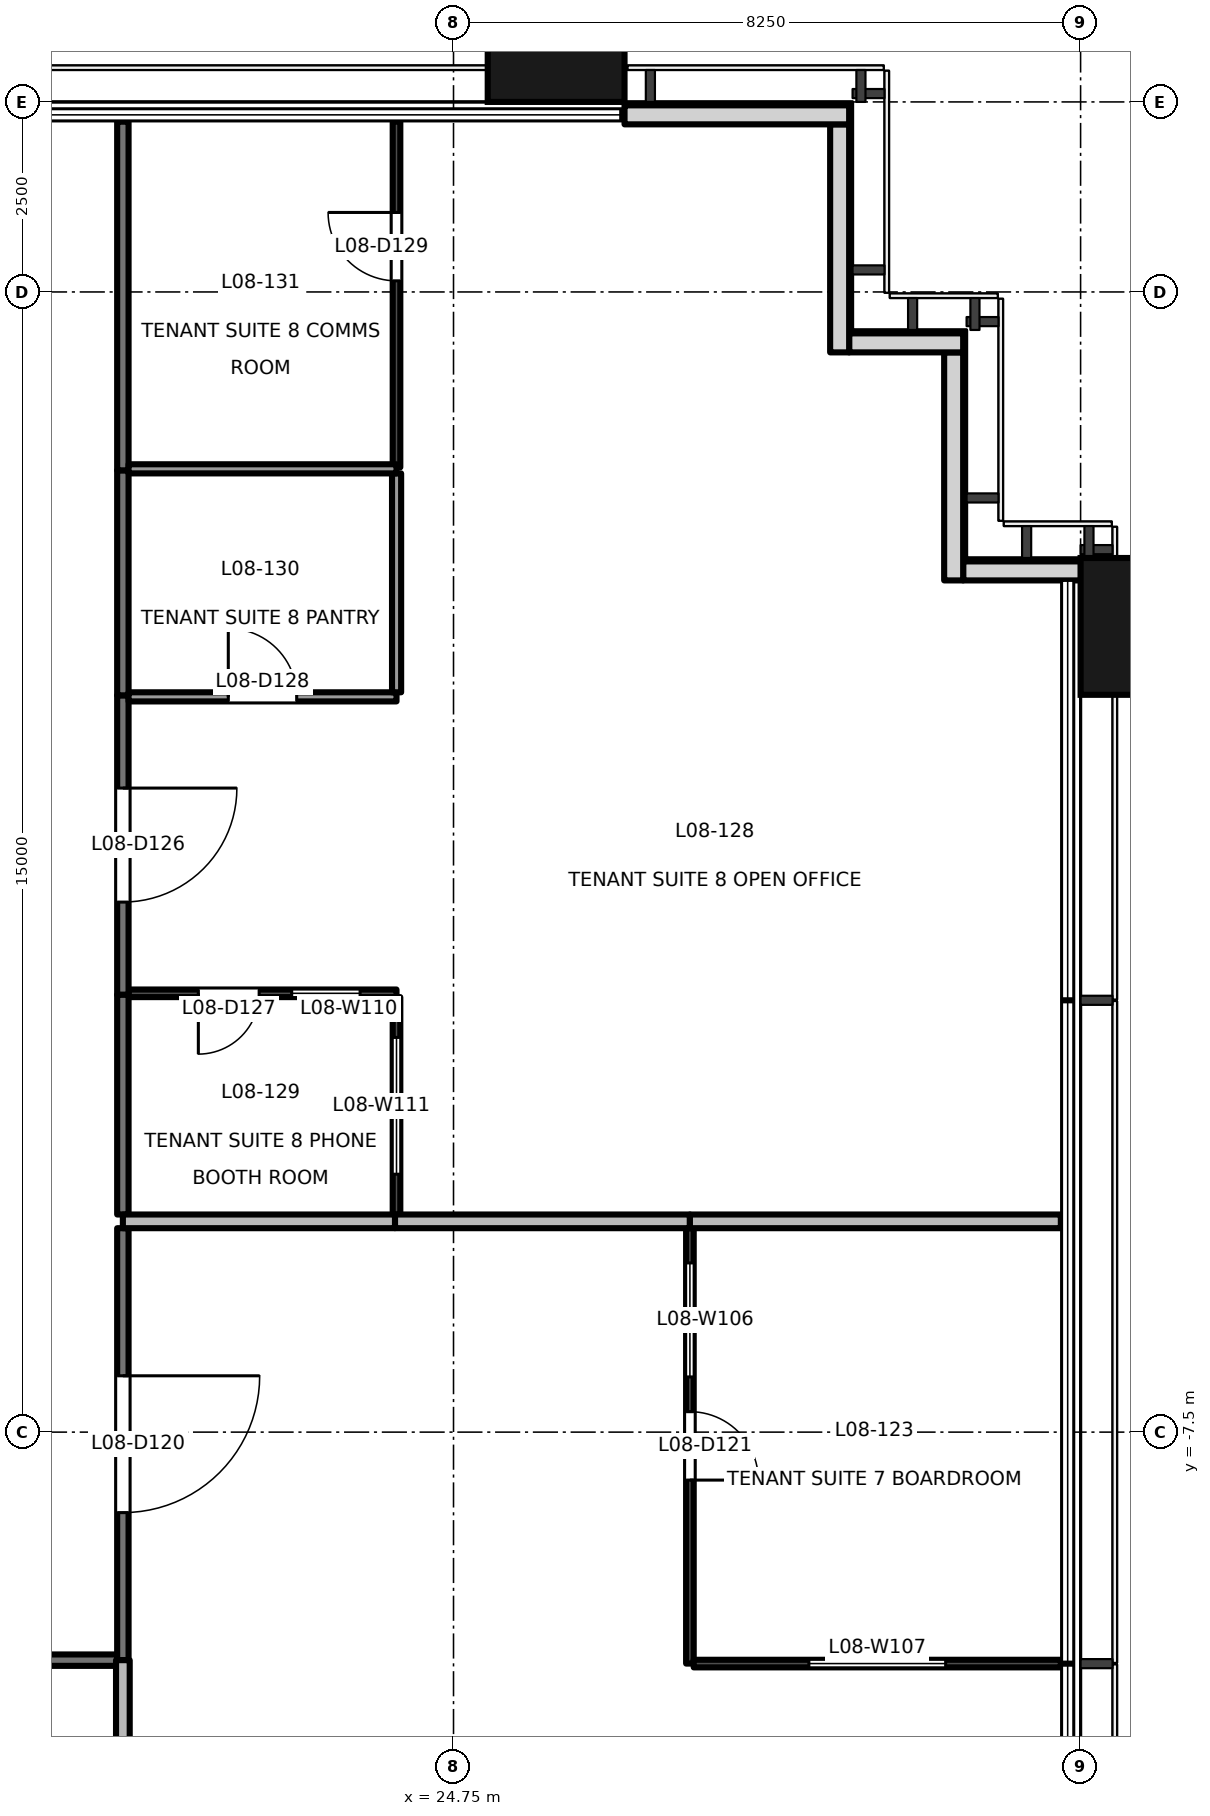
"""IFC4 building model, lengths in metres.
Left out: names, types, materials, properties, quantities, classifications, styles, units other than length and angle.
Written with IfcOpenShell. Run it as: python <this file> out.ifc"""

import sys

from ifc_helpers import new_model, si_unit, direction, frame, frame_2d, origin, origin_2d, place, context, subcontext, project, spatial, rectangle, extrude, element, fill, save


model = new_model("IFC4")
c1 = context("Model", 3, precision=1e-05, world=origin(), true_north=direction((0.0, 1.0)))
c2 = subcontext(c1, "Body", "Model", "MODEL_VIEW")
j1 = project(units=[si_unit("LENGTHUNIT", "METRE"), si_unit("PLANEANGLEUNIT", "RADIAN")], contexts=[c1])
p1 = place(None, origin())
s1 = spatial("IfcSite", under=j1, at=p1, CompositionType="ELEMENT")
p2 = place(p1, origin())
s2 = spatial("IfcBuilding", under=s1, at=p2, CompositionType="ELEMENT")
p3 = place(p2, frame((0.0, 0.0, 40.6)))
s3 = spatial("IfcBuildingStorey", under=s2, at=p3, CompositionType="ELEMENT", Elevation=40.6)
for number, where, z_axis, x_axis in (
    (1, (33.9, 3.1, -0.2), (0.0, 0.0, 1.0), (0.0, 1.0, 0.0)),
    (2, (26.1, 10.9, -0.2), (0.0, 0.0, 1.0), (1.0, 0.0, 0.0)),
):
    element("IfcColumn", number, at=place(p3, frame(where, z_axis=z_axis, x_axis=x_axis)), inside=s3, PredefinedType="COLUMN", context=c2, shape_type="SweptSolid", body=[
        extrude(rectangle(XDim=1.8, YDim=1.8, at=origin_2d()), origin(), (0.0, 0.0, 1.0), 4.1),
    ])
p4 = place(p3, frame((33.005, 3.83, 0.0), z_axis=(0.0, 0.0, 1.0), x_axis=(-1.0, 0.0, 0.0)))
e3 = element("IfcWall", 3, at=p4, inside=s3, PredefinedType="SOLIDWALL", context=c2, shape_type="SweptSolid", body=[
    extrude(rectangle(XDim=1.55, YDim=0.25, at=frame_2d((0.775, 0.0))), origin(), (0.0, 0.0, 1.0), 3.9),
])
p5 = place(p3, frame((31.33, 3.705, 0.0), z_axis=(0.0, 0.0, 1.0), x_axis=(0.0, 1.0, 0.0)))
e4 = element("IfcWall", 4, at=p5, inside=s3, PredefinedType="SOLIDWALL", context=c2, shape_type="SweptSolid", body=[
    extrude(rectangle(XDim=3.0, YDim=0.25, at=frame_2d((1.5, 0.0))), origin(), (0.0, 0.0, 1.0), 3.9),
])
p6 = place(p3, frame((31.455, 6.83, 0.0), z_axis=(0.0, 0.0, 1.0), x_axis=(-1.0, 0.0, 0.0)))
e5 = element("IfcWall", 5, at=p6, inside=s3, PredefinedType="SOLIDWALL", context=c2, shape_type="SweptSolid", body=[
    extrude(rectangle(XDim=1.5, YDim=0.25, at=frame_2d((0.75, 0.0))), origin(), (0.0, 0.0, 1.0), 3.9),
])
p7 = place(p3, frame((29.83, 6.705, 0.0), z_axis=(0.0, 0.0, 1.0), x_axis=(0.0, 1.0, 0.0)))
e6 = element("IfcWall", 6, at=p7, inside=s3, PredefinedType="SOLIDWALL", context=c2, shape_type="SweptSolid", body=[
    extrude(rectangle(XDim=3.0, YDim=0.25, at=frame_2d((1.5, 0.0))), origin(), (0.0, 0.0, 1.0), 3.9),
])
p8 = place(p3, frame((29.955, 9.83, 0.0), z_axis=(0.0, 0.0, 1.0), x_axis=(-1.0, 0.0, 0.0)))
e7 = element("IfcWall", 7, at=p8, inside=s3, PredefinedType="SOLIDWALL", context=c2, shape_type="SweptSolid", body=[
    extrude(rectangle(XDim=2.955, YDim=0.25, at=frame_2d((1.478, 0.0))), origin(), (0.0, 0.0, 1.0), 3.9),
])
p9 = place(p3, frame((20.325, -10.5, 0.0), z_axis=(0.0, 0.0, 1.0), x_axis=(-1.0, 0.0, 0.0)))
e8 = element("IfcWall", 8, at=p9, inside=s3, PredefinedType="PARTITIONING", context=c2, shape_type="SweptSolid", body=[
    extrude(rectangle(XDim=4.445, YDim=0.15, at=frame_2d((2.223, 0.0))), origin(), (0.0, 0.0, 1.0), 2.5),
])
p10 = place(p3, frame((20.4, -4.817, 0.0), z_axis=(0.0, 0.0, 1.0), x_axis=(0.0, -1.0, 0.0)))
e9 = element("IfcWall", 9, at=p10, inside=s3, PredefinedType="PARTITIONING", context=c2, shape_type="SweptSolid", body=[
    extrude(rectangle(XDim=5.683, YDim=0.15, at=frame_2d((2.842, 0.0))), origin(), (0.0, 0.0, 1.0), 3.3),
])
p11 = place(p10, frame((1.942, 0.0, 0.0)))
e10 = element("IfcOpeningElement", 10, at=p11, cuts=e9, PredefinedType="OPENING", context=c2, shape_type="SweptSolid", body=[
    extrude(rectangle(XDim=1.8, YDim=2.1, at=frame_2d((0.9, 1.05))), frame((0.0, 0.085, 0.0), z_axis=(0.0, -1.0, 0.0), x_axis=(1.0, 0.0, 0.0)), (0.0, 0.0, 1.0), 0.171),
])
p12 = place(p3, frame((20.4, 2.193, 0.0), z_axis=(0.0, 0.0, 1.0), x_axis=(0.0, -1.0, 0.0)))
e11 = element("IfcWall", 11, at=p12, inside=s3, PredefinedType="PARTITIONING", context=c2, shape_type="SweptSolid", body=[
    extrude(rectangle(XDim=3.94, YDim=0.15, at=frame_2d((1.97, 0.0))), origin(), (0.0, 0.0, 1.0), 3.3),
])
p13 = place(p12, frame((1.22, 0.0, 0.0)))
e12 = element("IfcOpeningElement", 12, at=p13, cuts=e11, PredefinedType="OPENING", context=c2, shape_type="SweptSolid", body=[
    extrude(rectangle(XDim=1.5, YDim=2.1, at=frame_2d((0.75, 1.05))), frame((0.0, 0.085, 0.0), z_axis=(0.0, -1.0, 0.0), x_axis=(1.0, 0.0, 0.0)), (0.0, 0.0, 1.0), 0.171),
])
p14 = place(p3, frame((20.4, -1.747, 0.0), z_axis=(0.0, 0.0, 1.0), x_axis=(0.0, -1.0, 0.0)))
e13 = element("IfcWall", 13, at=p14, inside=s3, PredefinedType="PARTITIONING", context=c2, shape_type="SweptSolid", body=[
    extrude(rectangle(XDim=2.89, YDim=0.15, at=frame_2d((1.445, 0.0))), origin(), (0.0, 0.0, 1.0), 3.3),
])
p15 = place(p3, frame((20.4, 5.153, 0.0), z_axis=(0.0, 0.0, 1.0), x_axis=(0.0, -1.0, 0.0)))
e14 = element("IfcWall", 14, at=p15, inside=s3, PredefinedType="PARTITIONING", context=c2, shape_type="SweptSolid", body=[
    extrude(rectangle(XDim=2.96, YDim=0.15, at=frame_2d((1.48, 0.0))), origin(), (0.0, 0.0, 1.0), 3.9),
])
p16 = place(p3, frame((20.4, 9.74, 0.0), z_axis=(0.0, 0.0, 1.0), x_axis=(0.0, -1.0, 0.0)))
e15 = element("IfcWall", 15, at=p16, inside=s3, PredefinedType="PARTITIONING", context=c2, shape_type="SweptSolid", body=[
    extrude(rectangle(XDim=4.587, YDim=0.15, at=frame_2d((2.293, 0.0))), origin(), (0.0, 0.0, 1.0), 3.9),
])
p17 = place(p3, frame((20.4, -10.5, 0.0), z_axis=(0.0, 0.0, 1.0), x_axis=(0.0, -1.0, 0.0)))
e16 = element("IfcWall", 16, at=p17, inside=s3, PredefinedType="PARTITIONING", context=c2, shape_type="SweptSolid", body=[
    extrude(rectangle(XDim=4.5, YDim=0.18, at=frame_2d((2.25, 0.0))), origin(), (0.0, 0.0, 1.0), 3.3),
])
p18 = place(p3, frame((27.86, -4.817, 0.0), z_axis=(0.0, 0.0, 1.0), x_axis=(0.0, -1.0, 0.0)))
e17 = element("IfcWall", 17, at=p18, inside=s3, PredefinedType="PARTITIONING", context=c2, shape_type="SweptSolid", body=[
    extrude(rectangle(XDim=5.728, YDim=0.1, at=frame_2d((2.864, 0.0))), origin(), (0.0, 0.0, 1.0), 3.3),
])
p19 = place(p18, frame((2.414, 0.0, 0.0)))
e18 = element("IfcOpeningElement", 18, at=p19, cuts=e17, PredefinedType="OPENING", context=c2, shape_type="SweptSolid", body=[
    extrude(rectangle(XDim=0.9, YDim=2.1, at=frame_2d((0.45, 1.05))), frame((0.0, 0.061, 0.0), z_axis=(0.0, -1.0, 0.0), x_axis=(1.0, 0.0, 0.0)), (0.0, 0.0, 1.0), 0.121),
])
p20 = place(p18, frame((0.457, 0.0, 0.9)))
e19 = element("IfcOpeningElement", 19, at=p20, cuts=e17, PredefinedType="OPENING", context=c2, shape_type="SweptSolid", body=[
    extrude(rectangle(XDim=1.5, YDim=1.2, at=frame_2d((0.75, 0.6))), frame((0.0, 0.061, 0.0), z_axis=(0.0, -1.0, 0.0), x_axis=(1.0, 0.0, 0.0)), (0.0, 0.0, 1.0), 0.121),
])
p21 = place(p3, frame((27.91, -10.545, 0.0), z_axis=(0.0, 0.0, 1.0), x_axis=(1.0, 0.0, 0.0)))
e20 = element("IfcWall", 20, at=p21, inside=s3, PredefinedType="PARTITIONING", context=c2, shape_type="SweptSolid", body=[
    extrude(rectangle(XDim=4.83, YDim=0.1, at=frame_2d((2.415, 0.0))), origin(), (0.0, 0.0, 1.0), 3.9),
])
p22 = place(p21, frame((1.515, 0.0, 0.9)))
e21 = element("IfcOpeningElement", 21, at=p22, cuts=e20, PredefinedType="OPENING", context=c2, shape_type="SweptSolid", body=[
    extrude(rectangle(XDim=1.8, YDim=1.2, at=frame_2d((0.9, 0.6))), frame((0.0, 0.061, 0.0), z_axis=(0.0, -1.0, 0.0), x_axis=(1.0, 0.0, 0.0)), (0.0, 0.0, 1.0), 0.121),
])
p23 = place(p3, frame((23.98, -4.727, 0.0), z_axis=(0.0, 0.0, 1.0), x_axis=(1.0, 0.0, 0.0)))
e22 = element("IfcWall", 22, at=p23, inside=s3, PredefinedType="PARTITIONING", context=c2, shape_type="SweptSolid", body=[
    extrude(rectangle(XDim=3.88, YDim=0.18, at=frame_2d((1.94, 0.0))), origin(), (0.0, 0.0, 1.0), 3.3),
])
p24 = place(p3, frame((20.4, -4.727, 0.0), z_axis=(0.0, 0.0, 1.0), x_axis=(1.0, 0.0, 0.0)))
e23 = element("IfcWall", 23, at=p24, inside=s3, PredefinedType="PARTITIONING", context=c2, shape_type="SweptSolid", body=[
    extrude(rectangle(XDim=3.58, YDim=0.18, at=frame_2d((1.79, 0.0))), origin(), (0.0, 0.0, 1.0), 3.3),
])
p25 = place(p3, frame((27.86, -4.727, 0.0), z_axis=(0.0, 0.0, 1.0), x_axis=(1.0, 0.0, 0.0)))
e24 = element("IfcWall", 24, at=p25, inside=s3, PredefinedType="PARTITIONING", context=c2, shape_type="SweptSolid", body=[
    extrude(rectangle(XDim=4.88, YDim=0.18, at=frame_2d((2.44, 0.0))), origin(), (0.0, 0.0, 1.0), 3.3),
])
p26 = place(p3, frame((24.0, -1.727, 0.0), z_axis=(0.0, 0.0, 1.0), x_axis=(-1.0, 0.0, 0.0)))
e25 = element("IfcWall", 25, at=p26, inside=s3, PredefinedType="PARTITIONING", context=c2, shape_type="SweptSolid", body=[
    extrude(rectangle(XDim=3.525, YDim=0.1, at=frame_2d((1.762, 0.0))), origin(), (0.0, 0.0, 1.0), 3.9),
])
p27 = place(p26, frame((1.807, 0.0, 0.0)))
e26 = element("IfcOpeningElement", 26, at=p27, cuts=e25, PredefinedType="OPENING", context=c2, shape_type="SweptSolid", body=[
    extrude(rectangle(XDim=0.8, YDim=2.1, at=frame_2d((0.4, 1.05))), frame((0.0, 0.061, 0.0), z_axis=(0.0, -1.0, 0.0), x_axis=(1.0, 0.0, 0.0)), (0.0, 0.0, 1.0), 0.121),
])
p28 = place(p26, frame((0.479, 0.0, 0.9)))
e27 = element("IfcOpeningElement", 27, at=p28, cuts=e25, PredefinedType="OPENING", context=c2, shape_type="SweptSolid", body=[
    extrude(rectangle(XDim=0.9, YDim=1.2, at=frame_2d((0.45, 0.6))), frame((0.0, 0.061, 0.0), z_axis=(0.0, -1.0, 0.0), x_axis=(1.0, 0.0, 0.0)), (0.0, 0.0, 1.0), 0.121),
])
p29 = place(p3, frame((24.0, -4.637, 0.0), z_axis=(0.0, 0.0, 1.0), x_axis=(0.0, 1.0, 0.0)))
e28 = element("IfcWall", 28, at=p29, inside=s3, PredefinedType="PARTITIONING", context=c2, shape_type="SweptSolid", body=[
    extrude(rectangle(XDim=2.86, YDim=0.1, at=frame_2d((1.43, 0.0))), origin(), (0.0, 0.0, 1.0), 3.3),
])
p30 = place(p29, frame((0.53, 0.0, 0.9)))
e29 = element("IfcOpeningElement", 29, at=p30, cuts=e28, PredefinedType="OPENING", context=c2, shape_type="SweptSolid", body=[
    extrude(rectangle(XDim=1.8, YDim=1.2, at=frame_2d((0.9, 0.6))), frame((0.0, 0.061, 0.0), z_axis=(0.0, -1.0, 0.0), x_axis=(1.0, 0.0, 0.0)), (0.0, 0.0, 1.0), 0.121),
])
p31 = place(p3, frame((20.475, 2.173, 0.0), z_axis=(0.0, 0.0, 1.0), x_axis=(1.0, 0.0, 0.0)))
e30 = element("IfcWall", 30, at=p31, inside=s3, PredefinedType="PARTITIONING", context=c2, shape_type="SweptSolid", body=[
    extrude(rectangle(XDim=3.525, YDim=0.12, at=frame_2d((1.762, 0.0))), origin(), (0.0, 0.0, 1.0), 3.9),
])
p32 = place(p31, frame((1.312, 0.0, 0.0)))
e31 = element("IfcOpeningElement", 31, at=p32, cuts=e30, PredefinedType="OPENING", context=c2, shape_type="SweptSolid", body=[
    extrude(rectangle(XDim=0.9, YDim=2.1, at=frame_2d((0.45, 1.05))), frame((0.0, 0.071, 0.0), z_axis=(0.0, -1.0, 0.0), x_axis=(1.0, 0.0, 0.0)), (0.0, 0.0, 1.0), 0.141),
])
p33 = place(p3, frame((24.001, 2.233, 0.0), z_axis=(0.0, 0.0, 1.0), x_axis=(0.0, 1.0, 0.0)))
e32 = element("IfcWall", 32, at=p33, inside=s3, PredefinedType="PARTITIONING", context=c2, shape_type="SweptSolid", body=[
    extrude(rectangle(XDim=2.88, YDim=0.12, at=frame_2d((1.44, 0.0))), origin(), (0.0, 0.0, 1.0), 3.9),
])
p34 = place(p3, frame((24.0, 5.193, 0.0), z_axis=(0.0, 0.0, 1.0), x_axis=(0.0, 1.0, 0.0)))
e33 = element("IfcWall", 33, at=p34, inside=s3, PredefinedType="PARTITIONING", context=c2, shape_type="SweptSolid", body=[
    extrude(rectangle(XDim=4.547, YDim=0.1, at=frame_2d((2.273, 0.0))), origin(), (0.0, 0.0, 1.0), 3.9),
])
p35 = place(p34, frame((2.453, 0.0, 0.0)))
e34 = element("IfcOpeningElement", 34, at=p35, cuts=e33, PredefinedType="OPENING", context=c2, shape_type="SweptSolid", body=[
    extrude(rectangle(XDim=0.9, YDim=2.1, at=frame_2d((0.45, 1.05))), frame((0.0, 0.061, 0.0), z_axis=(0.0, -1.0, 0.0), x_axis=(1.0, 0.0, 0.0)), (0.0, 0.0, 1.0), 0.121),
])
p36 = place(p3, frame((20.475, 5.173, 0.0), z_axis=(0.0, 0.0, 1.0), x_axis=(1.0, 0.0, 0.0)))
e35 = element("IfcWall", 35, at=p36, inside=s3, PredefinedType="PARTITIONING", context=c2, shape_type="SweptSolid", body=[
    extrude(rectangle(XDim=3.525, YDim=0.12, at=frame_2d((1.762, 0.0))), origin(), (0.0, 0.0, 1.0), 3.9),
])
p37 = place(p11, origin())
e36 = element("IfcDoor", 36, at=p37, inside=s3, OperationType="DOUBLE_DOOR_SINGLE_SWING", PredefinedType="DOOR", context=c2, shape_type="SweptSolid", body=[
    extrude(rectangle(XDim=1.8, YDim=2.1, at=frame_2d((0.9, 1.05))), frame((0.0, 0.025, 0.0), z_axis=(0.0, -1.0, 0.0), x_axis=(1.0, 0.0, 0.0)), (0.0, 0.0, 1.0), 0.05),
])
fill(e10, e36)
p38 = place(p19, origin())
e37 = element("IfcDoor", 37, at=p38, inside=s3, OperationType="SINGLE_SWING_RIGHT", PredefinedType="DOOR", context=c2, shape_type="SweptSolid", body=[
    extrude(rectangle(XDim=0.9, YDim=2.1, at=frame_2d((0.45, 1.05))), frame((0.0, 0.025, 0.0), z_axis=(0.0, -1.0, 0.0), x_axis=(1.0, 0.0, 0.0)), (0.0, 0.0, 1.0), 0.05),
])
fill(e18, e37)
p39 = place(p13, origin())
e38 = element("IfcDoor", 38, at=p39, inside=s3, OperationType="DOUBLE_DOOR_SINGLE_SWING", PredefinedType="DOOR", context=c2, shape_type="SweptSolid", body=[
    extrude(rectangle(XDim=1.5, YDim=2.1, at=frame_2d((0.75, 1.05))), frame((0.0, 0.025, 0.0), z_axis=(0.0, -1.0, 0.0), x_axis=(1.0, 0.0, 0.0)), (0.0, 0.0, 1.0), 0.05),
])
fill(e12, e38)
p40 = place(p27, origin())
e39 = element("IfcDoor", 39, at=p40, inside=s3, OperationType="SINGLE_SWING_RIGHT", PredefinedType="DOOR", context=c2, shape_type="SweptSolid", body=[
    extrude(rectangle(XDim=0.8, YDim=2.1, at=frame_2d((0.4, 1.05))), frame((0.0, 0.025, 0.0), z_axis=(0.0, -1.0, 0.0), x_axis=(1.0, 0.0, 0.0)), (0.0, 0.0, 1.0), 0.05),
])
fill(e26, e39)
p41 = place(p32, origin())
e40 = element("IfcDoor", 40, at=p41, inside=s3, OperationType="SINGLE_SWING_LEFT", PredefinedType="DOOR", context=c2, shape_type="SweptSolid", body=[
    extrude(rectangle(XDim=0.9, YDim=2.1, at=frame_2d((0.45, 1.05))), frame((0.0, 0.025, 0.0), z_axis=(0.0, -1.0, 0.0), x_axis=(1.0, 0.0, 0.0)), (0.0, 0.0, 1.0), 0.05),
])
fill(e31, e40)
p42 = place(p35, origin())
e41 = element("IfcDoor", 41, at=p42, inside=s3, OperationType="SINGLE_SWING_RIGHT", PredefinedType="DOOR", context=c2, shape_type="SweptSolid", body=[
    extrude(rectangle(XDim=0.9, YDim=2.1, at=frame_2d((0.45, 1.05))), frame((0.0, 0.025, 0.0), z_axis=(0.0, -1.0, 0.0), x_axis=(1.0, 0.0, 0.0)), (0.0, 0.0, 1.0), 0.05),
])
fill(e34, e41)
p43 = place(p20, origin())
e42 = element("IfcWindow", 42, at=p43, inside=s3, PartitioningType="SINGLE_PANEL", PredefinedType="WINDOW", context=c2, shape_type="SweptSolid", body=[
    extrude(rectangle(XDim=1.5, YDim=1.2, at=frame_2d((0.75, 0.6))), frame((0.0, 0.03, 0.0), z_axis=(0.0, -1.0, 0.0), x_axis=(1.0, 0.0, 0.0)), (0.0, 0.0, 1.0), 0.06),
])
fill(e19, e42)
p44 = place(p22, origin())
e43 = element("IfcWindow", 43, at=p44, inside=s3, PartitioningType="SINGLE_PANEL", PredefinedType="WINDOW", context=c2, shape_type="SweptSolid", body=[
    extrude(rectangle(XDim=1.8, YDim=1.2, at=frame_2d((0.9, 0.6))), frame((0.0, 0.03, 0.0), z_axis=(0.0, -1.0, 0.0), x_axis=(1.0, 0.0, 0.0)), (0.0, 0.0, 1.0), 0.06),
])
fill(e21, e43)
p45 = place(p28, origin())
e44 = element("IfcWindow", 44, at=p45, inside=s3, PartitioningType="SINGLE_PANEL", PredefinedType="WINDOW", context=c2, shape_type="SweptSolid", body=[
    extrude(rectangle(XDim=0.9, YDim=1.2, at=frame_2d((0.45, 0.6))), frame((0.0, 0.03, 0.0), z_axis=(0.0, -1.0, 0.0), x_axis=(1.0, 0.0, 0.0)), (0.0, 0.0, 1.0), 0.06),
])
fill(e27, e44)
p46 = place(p30, origin())
e45 = element("IfcWindow", 45, at=p46, inside=s3, PartitioningType="SINGLE_PANEL", PredefinedType="WINDOW", context=c2, shape_type="SweptSolid", body=[
    extrude(rectangle(XDim=1.8, YDim=1.2, at=frame_2d((0.9, 0.6))), frame((0.0, 0.03, 0.0), z_axis=(0.0, -1.0, 0.0), x_axis=(1.0, 0.0, 0.0)), (0.0, 0.0, 1.0), 0.06),
])
fill(e29, e45)
save(model, sys.argv[1])
